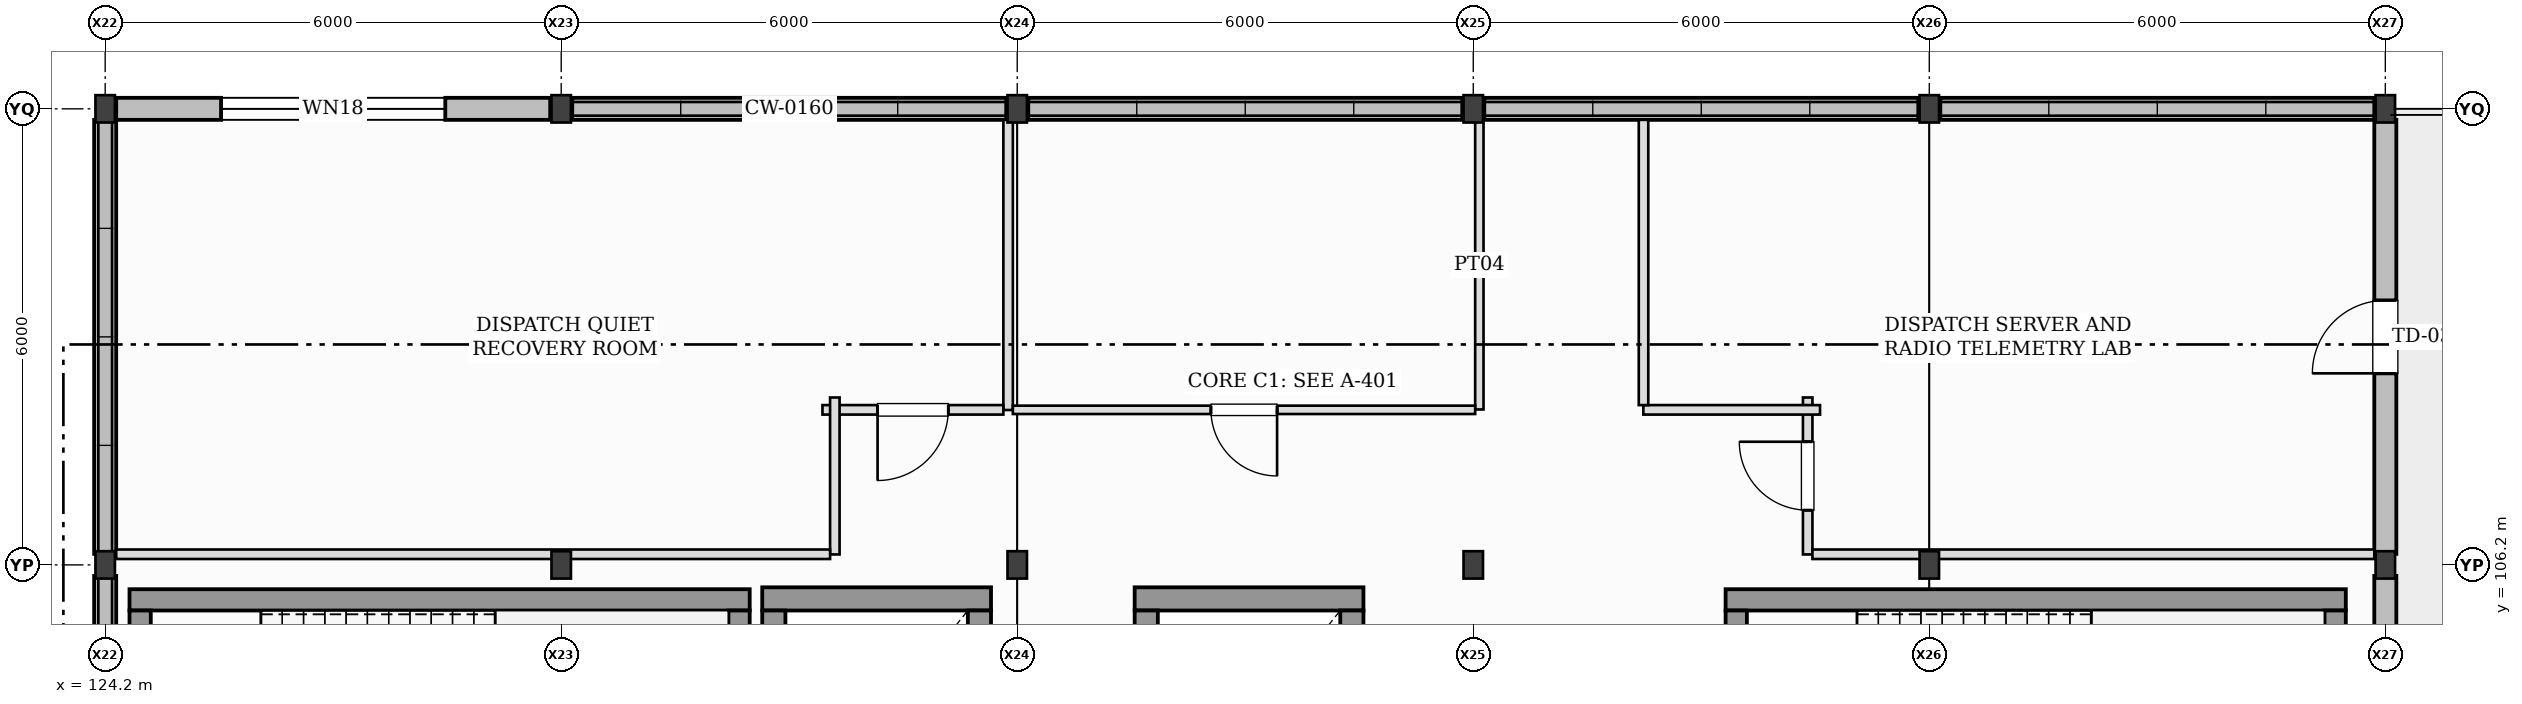
"""IFC4 building model, lengths in metres.
Left out: names, types, materials, properties, quantities, classifications, styles, units other than length and angle.
Written with IfcOpenShell. Run it as: python <this file> out.ifc"""

import sys

from ifc_helpers import new_model, si_unit, direction, frame, frame_2d, origin, origin_2d, place, context, subcontext, project, spatial, rectangle, i_section, extrude, element, fill, save


model = new_model("IFC4")
c1 = context("Model", 3, precision=1e-05, world=origin(), true_north=direction((0.0, 1.0)))
c2 = subcontext(c1, "Body", "Model", "MODEL_VIEW")
j1 = project(units=[si_unit("LENGTHUNIT", "METRE"), si_unit("PLANEANGLEUNIT", "RADIAN")], contexts=[c1])
p1 = place(None, origin())
s1 = spatial("IfcSite", under=j1, at=p1, CompositionType="ELEMENT")
p2 = place(p1, origin())
s2 = spatial("IfcBuilding", under=s1, at=p2, CompositionType="ELEMENT")
p3 = place(p2, frame((0.0, 0.0, 14.0)))
s3 = spatial("IfcBuildingStorey", under=s2, at=p3, CompositionType="ELEMENT", Elevation=14.0)
for number, where, z_axis, x_axis in (
    (1, (124.2, 106.2, 0.0), (0.0, 0.0, 1.0), (1.0, 0.0, 0.0)),
    (2, (124.2, 112.2, 0.0), (0.0, 0.0, 1.0), (1.0, 0.0, 0.0)),
    (3, (130.2, 106.2, 0.0), (0.0, 0.0, 1.0), (1.0, 0.0, 0.0)),
    (4, (130.2, 112.2, 0.0), (0.0, 0.0, 1.0), (1.0, 0.0, 0.0)),
    (5, (136.2, 106.2, 0.0), (0.0, 0.0, 1.0), (1.0, 0.0, 0.0)),
    (6, (136.2, 112.2, 0.0), (0.0, 0.0, 1.0), (1.0, 0.0, 0.0)),
    (7, (142.2, 106.2, 0.0), (0.0, 0.0, 1.0), (1.0, 0.0, 0.0)),
    (8, (142.2, 112.2, 0.0), (0.0, 0.0, 1.0), (1.0, 0.0, 0.0)),
    (9, (148.2, 106.2, 0.0), (0.0, 0.0, 1.0), (1.0, 0.0, 0.0)),
    (10, (148.2, 112.2, 0.0), (0.0, 0.0, 1.0), (1.0, 0.0, 0.0)),
    (11, (154.2, 106.2, 0.0), (0.0, 0.0, 1.0), (1.0, 0.0, 0.0)),
    (12, (154.2, 112.2, 0.0), (0.0, 0.0, 1.0), (1.0, 0.0, 0.0)),
):
    element("IfcColumn", number, at=place(p3, frame(where, z_axis=z_axis, x_axis=x_axis)), inside=s3, PredefinedType="COLUMN", context=c2, shape_type="SweptSolid", body=[
        extrude(i_section(OverallWidth=0.256, OverallDepth=0.36, WebThickness=0.011, FlangeThickness=0.02, at=origin_2d()), origin(), (0.0, 0.0, 1.0), 4.0),
    ])
p4 = place(p3, frame((130.055, 112.2, 0.0), z_axis=(0.0, 0.0, 1.0), x_axis=(-1.0, 0.0, 0.0)))
e13 = element("IfcWall", 13, at=p4, inside=s3, PredefinedType="STANDARD", context=c2, shape_type="SweptSolid", body=[
    extrude(rectangle(XDim=5.71, YDim=0.29, at=frame_2d((2.855, 0.0))), origin(), (0.0, 0.0, 1.0), 3.269),
])
p5 = place(p4, frame((1.38, 0.0, 1.0)))
e14 = element("IfcOpeningElement", 14, at=p5, cuts=e13, PredefinedType="OPENING", context=c2, shape_type="SweptSolid", body=[
    extrude(rectangle(XDim=2.95, YDim=1.55, at=frame_2d((1.475, 0.775))), frame((0.0, 0.155, 0.0), z_axis=(0.0, -1.0, 0.0), x_axis=(1.0, 0.0, 0.0)), (0.0, 0.0, 1.0), 0.31),
])
p6 = place(p3, frame((136.055, 112.2, 0.0), z_axis=(0.0, 0.0, 1.0), x_axis=(-1.0, 0.0, 0.0)))
e15 = element("IfcWall", 15, at=p6, inside=s3, PredefinedType="STANDARD", context=c2, shape_type="SweptSolid", body=[
    extrude(rectangle(XDim=5.71, YDim=0.29, at=frame_2d((2.855, 0.0))), origin(), (0.0, 0.0, 1.0), 0.32),
])
p7 = place(p3, frame((142.055, 112.2, 0.0), z_axis=(0.0, 0.0, 1.0), x_axis=(-1.0, 0.0, 0.0)))
e16 = element("IfcWall", 16, at=p7, inside=s3, PredefinedType="STANDARD", context=c2, shape_type="SweptSolid", body=[
    extrude(rectangle(XDim=5.71, YDim=0.29, at=frame_2d((2.855, 0.0))), origin(), (0.0, 0.0, 1.0), 0.44),
])
p8 = place(p3, frame((148.055, 112.2, 0.0), z_axis=(0.0, 0.0, 1.0), x_axis=(-1.0, 0.0, 0.0)))
e17 = element("IfcWall", 17, at=p8, inside=s3, PredefinedType="STANDARD", context=c2, shape_type="SweptSolid", body=[
    extrude(rectangle(XDim=5.71, YDim=0.29, at=frame_2d((2.855, 0.0))), origin(), (0.0, 0.0, 1.0), 0.56),
])
p9 = place(p3, frame((154.055, 112.2, 0.0), z_axis=(0.0, 0.0, 1.0), x_axis=(-1.0, 0.0, 0.0)))
e18 = element("IfcWall", 18, at=p9, inside=s3, PredefinedType="STANDARD", context=c2, shape_type="SweptSolid", body=[
    extrude(rectangle(XDim=5.71, YDim=0.29, at=frame_2d((2.855, 0.0))), origin(), (0.0, 0.0, 1.0), 0.68),
])
p10 = place(p3, frame((124.2, 106.055, 0.0), z_axis=(0.0, 0.0, 1.0), x_axis=(0.0, -1.0, 0.0)))
e19 = element("IfcWall", 19, at=p10, inside=s3, PredefinedType="STANDARD", context=c2, shape_type="SweptSolid", body=[
    extrude(rectangle(XDim=5.71, YDim=0.29, at=frame_2d((2.855, 0.0))), origin(), (0.0, 0.0, 1.0), 0.92),
])
p11 = place(p3, frame((124.2, 112.055, 0.0), z_axis=(0.0, 0.0, 1.0), x_axis=(0.0, -1.0, 0.0)))
e20 = element("IfcWall", 20, at=p11, inside=s3, PredefinedType="STANDARD", context=c2, shape_type="SweptSolid", body=[
    extrude(rectangle(XDim=5.71, YDim=0.29, at=frame_2d((2.855, 0.0))), origin(), (0.0, 0.0, 1.0), 0.32),
])
p12 = place(p3, frame((154.2, 100.345, 0.0), z_axis=(0.0, 0.0, 1.0), x_axis=(0.0, 1.0, 0.0)))
e21 = element("IfcWall", 21, at=p12, inside=s3, PredefinedType="STANDARD", context=c2, shape_type="SweptSolid", body=[
    extrude(rectangle(XDim=5.71, YDim=0.29, at=frame_2d((2.855, 0.0))), origin(), (0.0, 0.0, 1.0), 3.273),
])
p13 = place(p12, frame((0.643, 0.0, 0.0)))
e22 = element("IfcOpeningElement", 22, at=p13, cuts=e21, PredefinedType="OPENING", context=c2, shape_type="SweptSolid", body=[
    extrude(rectangle(XDim=1.04, YDim=2.16, at=frame_2d((0.52, 1.08))), frame((0.0, 0.155, 0.0), z_axis=(0.0, -1.0, 0.0), x_axis=(1.0, 0.0, 0.0)), (0.0, 0.0, 1.0), 0.31),
])
p14 = place(p3, frame((154.2, 106.345, 0.0), z_axis=(0.0, 0.0, 1.0), x_axis=(0.0, 1.0, 0.0)))
e23 = element("IfcWall", 23, at=p14, inside=s3, PredefinedType="STANDARD", context=c2, shape_type="SweptSolid", body=[
    extrude(rectangle(XDim=5.71, YDim=0.29, at=frame_2d((2.855, 0.0))), origin(), (0.0, 0.0, 1.0), 3.273),
])
p15 = place(p14, frame((2.375, 0.0, 0.0)))
e24 = element("IfcOpeningElement", 24, at=p15, cuts=e23, PredefinedType="OPENING", context=c2, shape_type="SweptSolid", body=[
    extrude(rectangle(XDim=0.96, YDim=2.14, at=frame_2d((0.48, 1.07))), frame((0.0, 0.155, 0.0), z_axis=(0.0, -1.0, 0.0), x_axis=(1.0, 0.0, 0.0)), (0.0, 0.0, 1.0), 0.31),
])
p16 = place(p3, frame((132.68, 105.74, 0.0), z_axis=(0.0, 0.0, 1.0), x_axis=(-1.0, 0.0, 0.0)))
e25 = element("IfcWall", 25, at=p16, inside=s3, PredefinedType="SHEAR", context=c2, shape_type="SweptSolid", body=[
    extrude(rectangle(XDim=8.16, YDim=0.28, at=frame_2d((4.08, 0.0))), origin(), (0.0, 0.0, 1.0), 4.0),
])
for number, where, z_axis, x_axis in (
    (26, (124.66, 105.6, 0.0), (0.0, 0.0, 1.0), (0.0, -1.0, 0.0)),
    (27, (132.54, 102.6, 0.0), (0.0, 0.0, 1.0), (0.0, 1.0, 0.0)),
):
    element("IfcWall", number, at=place(p3, frame(where, z_axis=z_axis, x_axis=x_axis)), inside=s3, PredefinedType="SHEAR", context=c2, shape_type="SweptSolid", body=[
        extrude(rectangle(XDim=3.0, YDim=0.28, at=frame_2d((1.5, 0.0))), origin(), (0.0, 0.0, 1.0), 4.0),
    ])
p17 = place(p3, frame((153.68, 105.74, 0.0), z_axis=(0.0, 0.0, 1.0), x_axis=(-1.0, 0.0, 0.0)))
e28 = element("IfcWall", 28, at=p17, inside=s3, PredefinedType="SHEAR", context=c2, shape_type="SweptSolid", body=[
    extrude(rectangle(XDim=8.16, YDim=0.28, at=frame_2d((4.08, 0.0))), origin(), (0.0, 0.0, 1.0), 4.0),
])
for number, where, z_axis, x_axis in (
    (29, (145.66, 105.6, 0.0), (0.0, 0.0, 1.0), (0.0, -1.0, 0.0)),
    (30, (153.54, 102.6, 0.0), (0.0, 0.0, 1.0), (0.0, 1.0, 0.0)),
):
    element("IfcWall", number, at=place(p3, frame(where, z_axis=z_axis, x_axis=x_axis)), inside=s3, PredefinedType="SHEAR", context=c2, shape_type="SweptSolid", body=[
        extrude(rectangle(XDim=3.0, YDim=0.28, at=frame_2d((1.5, 0.0))), origin(), (0.0, 0.0, 1.0), 4.0),
    ])
p18 = place(p3, frame((135.855, 105.752, 0.0), z_axis=(0.0, 0.0, 1.0), x_axis=(-1.0, 0.0, 0.0)))
e31 = element("IfcWall", 31, at=p18, inside=s3, PredefinedType="SHEAR", context=c2, shape_type="SweptSolid", body=[
    extrude(rectangle(XDim=3.01, YDim=0.305, at=frame_2d((1.505, 0.0))), origin(), (0.0, 0.0, 1.0), 4.0),
])
for number, where, z_axis, x_axis in (
    (32, (132.998, 105.6, 0.0), (0.0, 0.0, 1.0), (0.0, -1.0, 0.0)),
    (33, (135.702, 102.6, 0.0), (0.0, 0.0, 1.0), (0.0, 1.0, 0.0)),
):
    element("IfcWall", number, at=place(p3, frame(where, z_axis=z_axis, x_axis=x_axis)), inside=s3, PredefinedType="SHEAR", context=c2, shape_type="SweptSolid", body=[
        extrude(rectangle(XDim=3.0, YDim=0.305, at=frame_2d((1.5, 0.0))), origin(), (0.0, 0.0, 1.0), 4.0),
    ])
p19 = place(p3, frame((140.755, 105.752, 0.0), z_axis=(0.0, 0.0, 1.0), x_axis=(-1.0, 0.0, 0.0)))
e34 = element("IfcWall", 34, at=p19, inside=s3, PredefinedType="SHEAR", context=c2, shape_type="SweptSolid", body=[
    extrude(rectangle(XDim=3.01, YDim=0.305, at=frame_2d((1.505, 0.0))), origin(), (0.0, 0.0, 1.0), 4.0),
])
for number, where, z_axis, x_axis in (
    (35, (137.897, 105.6, 0.0), (0.0, 0.0, 1.0), (0.0, -1.0, 0.0)),
    (36, (140.603, 102.6, 0.0), (0.0, 0.0, 1.0), (0.0, 1.0, 0.0)),
):
    element("IfcWall", number, at=place(p3, frame(where, z_axis=z_axis, x_axis=x_axis)), inside=s3, PredefinedType="SHEAR", context=c2, shape_type="SweptSolid", body=[
        extrude(rectangle(XDim=3.0, YDim=0.305, at=frame_2d((1.5, 0.0))), origin(), (0.0, 0.0, 1.0), 4.0),
    ])
p20 = place(p3, frame((136.08, 112.055, 0.0), z_axis=(0.0, 0.0, 1.0), x_axis=(0.0, -1.0, 0.0)))
e37 = element("IfcWall", 37, at=p20, inside=s3, PredefinedType="PARTITIONING", context=c2, shape_type="SweptSolid", body=[
    extrude(rectangle(XDim=3.817, YDim=0.125, at=frame_2d((1.909, 0.0))), origin(), (0.0, 0.0, 1.0), 3.273),
])
p21 = place(p3, frame((136.018, 108.24, 0.0), z_axis=(0.0, 0.0, 1.0), x_axis=(-1.0, 0.0, 0.0)))
e38 = element("IfcWall", 38, at=p21, inside=s3, PredefinedType="PARTITIONING", context=c2, shape_type="SweptSolid", body=[
    extrude(rectangle(XDim=2.38, YDim=0.125, at=frame_2d((1.19, 0.0))), origin(), (0.0, 0.0, 1.0), 3.76),
])
p22 = place(p21, frame((0.725, 0.0, 0.0)))
e39 = element("IfcOpeningElement", 39, at=p22, cuts=e38, PredefinedType="OPENING", context=c2, shape_type="SweptSolid", body=[
    extrude(rectangle(XDim=0.93, YDim=2.1, at=frame_2d((0.465, 1.05))), frame((0.0, 0.073, 0.0), z_axis=(0.0, -1.0, 0.0), x_axis=(1.0, 0.0, 0.0)), (0.0, 0.0, 1.0), 0.145),
])
p23 = place(p3, frame((133.8, 108.403, 0.0), z_axis=(0.0, 0.0, 1.0), x_axis=(0.0, -1.0, 0.0)))
e40 = element("IfcWall", 40, at=p23, inside=s3, PredefinedType="PARTITIONING", context=c2, shape_type="SweptSolid", body=[
    extrude(rectangle(XDim=2.065, YDim=0.125, at=frame_2d((1.033, 0.0))), origin(), (0.0, 0.0, 1.0), 3.76),
])
p24 = place(p3, frame((133.738, 106.34, 0.0), z_axis=(0.0, 0.0, 1.0), x_axis=(-1.0, 0.0, 0.0)))
e41 = element("IfcWall", 41, at=p24, inside=s3, PredefinedType="PARTITIONING", context=c2, shape_type="SweptSolid", body=[
    extrude(rectangle(XDim=9.393, YDim=0.125, at=frame_2d((4.696, 0.0))), origin(), (0.0, 0.0, 1.0), 3.269),
])
p25 = place(p3, frame((142.28, 112.055, 0.0), z_axis=(0.0, 0.0, 1.0), x_axis=(0.0, -1.0, 0.0)))
e42 = element("IfcWall", 42, at=p25, inside=s3, PredefinedType="PARTITIONING", context=c2, shape_type="SweptSolid", body=[
    extrude(rectangle(XDim=3.81, YDim=0.11, at=frame_2d((1.905, 0.0))), origin(), (0.0, 0.0, 1.0), 3.273),
])
p26 = place(p3, frame((142.225, 108.24, 0.0), z_axis=(0.0, 0.0, 1.0), x_axis=(-1.0, 0.0, 0.0)))
e43 = element("IfcWall", 43, at=p26, inside=s3, PredefinedType="PARTITIONING", context=c2, shape_type="SweptSolid", body=[
    extrude(rectangle(XDim=6.083, YDim=0.11, at=frame_2d((3.041, 0.0))), origin(), (0.0, 0.0, 1.0), 3.76),
])
p27 = place(p26, frame((2.606, 0.0, 0.0)))
e44 = element("IfcOpeningElement", 44, at=p27, cuts=e43, PredefinedType="OPENING", context=c2, shape_type="SweptSolid", body=[
    extrude(rectangle(XDim=0.87, YDim=2.06, at=frame_2d((0.435, 1.03))), frame((0.0, 0.065, 0.0), z_axis=(0.0, -1.0, 0.0), x_axis=(1.0, 0.0, 0.0)), (0.0, 0.0, 1.0), 0.13),
])
p28 = place(p3, frame((146.6, 106.337, 0.0), z_axis=(0.0, 0.0, 1.0), x_axis=(0.0, 1.0, 0.0)))
e45 = element("IfcWall", 45, at=p28, inside=s3, PredefinedType="PARTITIONING", context=c2, shape_type="SweptSolid", body=[
    extrude(rectangle(XDim=2.065, YDim=0.125, at=frame_2d((1.033, 0.0))), origin(), (0.0, 0.0, 1.0), 3.76),
])
p29 = place(p28, frame((0.583, 0.0, 0.0)))
e46 = element("IfcOpeningElement", 46, at=p29, cuts=e45, PredefinedType="OPENING", context=c2, shape_type="SweptSolid", body=[
    extrude(rectangle(XDim=0.9, YDim=2.1, at=frame_2d((0.45, 1.05))), frame((0.0, 0.073, 0.0), z_axis=(0.0, -1.0, 0.0), x_axis=(1.0, 0.0, 0.0)), (0.0, 0.0, 1.0), 0.145),
])
p30 = place(p3, frame((146.762, 108.24, 0.0), z_axis=(0.0, 0.0, 1.0), x_axis=(-1.0, 0.0, 0.0)))
e47 = element("IfcWall", 47, at=p30, inside=s3, PredefinedType="PARTITIONING", context=c2, shape_type="SweptSolid", body=[
    extrude(rectangle(XDim=2.325, YDim=0.125, at=frame_2d((1.163, 0.0))), origin(), (0.0, 0.0, 1.0), 3.76),
])
p31 = place(p3, frame((144.44, 108.302, 0.0), z_axis=(0.0, 0.0, 1.0), x_axis=(0.0, 1.0, 0.0)))
e48 = element("IfcWall", 48, at=p31, inside=s3, PredefinedType="PARTITIONING", context=c2, shape_type="SweptSolid", body=[
    extrude(rectangle(XDim=3.752, YDim=0.125, at=frame_2d((1.876, 0.0))), origin(), (0.0, 0.0, 1.0), 3.374),
])
p32 = place(p3, frame((154.055, 106.34, 0.0), z_axis=(0.0, 0.0, 1.0), x_axis=(-1.0, 0.0, 0.0)))
e49 = element("IfcWall", 49, at=p32, inside=s3, PredefinedType="PARTITIONING", context=c2, shape_type="SweptSolid", body=[
    extrude(rectangle(XDim=7.392, YDim=0.125, at=frame_2d((3.696, 0.0))), origin(), (0.0, 0.0, 1.0), 3.269),
])
p33 = place(p5, origin())
e50 = element("IfcWindow", 50, at=p33, inside=s3, PartitioningType="SINGLE_PANEL", PredefinedType="WINDOW", context=c2, shape_type="SweptSolid", body=[
    extrude(rectangle(XDim=2.95, YDim=1.55, at=frame_2d((1.475, 0.775))), frame((0.0, 0.03, 0.0), z_axis=(0.0, -1.0, 0.0), x_axis=(1.0, 0.0, 0.0)), (0.0, 0.0, 1.0), 0.06),
])
fill(e14, e50)
p34 = place(p15, frame((0.96, 0.0, 0.0), z_axis=(0.0, 0.0, 1.0), x_axis=(-1.0, 0.0, 0.0)))
e51 = element("IfcDoor", 51, at=p34, inside=s3, OperationType="SINGLE_SWING_LEFT", PredefinedType="DOOR", context=c2, shape_type="SweptSolid", body=[
    extrude(rectangle(XDim=0.96, YDim=2.14, at=frame_2d((0.48, 1.07))), frame((0.0, 0.025, 0.0), z_axis=(0.0, -1.0, 0.0), x_axis=(1.0, 0.0, 0.0)), (0.0, 0.0, 1.0), 0.05),
])
fill(e24, e51)
p35 = place(p22, frame((0.93, 0.0, 0.0), z_axis=(0.0, 0.0, 1.0), x_axis=(-1.0, 0.0, 0.0)))
e52 = element("IfcDoor", 52, at=p35, inside=s3, OperationType="SINGLE_SWING_RIGHT", PredefinedType="DOOR", context=c2, shape_type="SweptSolid", body=[
    extrude(rectangle(XDim=0.93, YDim=2.1, at=frame_2d((0.465, 1.05))), frame((0.0, 0.025, 0.0), z_axis=(0.0, -1.0, 0.0), x_axis=(1.0, 0.0, 0.0)), (0.0, 0.0, 1.0), 0.05),
])
fill(e39, e52)
p36 = place(p27, frame((0.87, 0.0, 0.0), z_axis=(0.0, 0.0, 1.0), x_axis=(-1.0, 0.0, 0.0)))
e53 = element("IfcDoor", 53, at=p36, inside=s3, OperationType="SINGLE_SWING_LEFT", PredefinedType="DOOR", context=c2, shape_type="SweptSolid", body=[
    extrude(rectangle(XDim=0.87, YDim=2.06, at=frame_2d((0.435, 1.03))), frame((0.0, 0.025, 0.0), z_axis=(0.0, -1.0, 0.0), x_axis=(1.0, 0.0, 0.0)), (0.0, 0.0, 1.0), 0.05),
])
fill(e44, e53)
p37 = place(p29, frame((0.9, 0.0, 0.0), z_axis=(0.0, 0.0, 1.0), x_axis=(-1.0, 0.0, 0.0)))
e54 = element("IfcDoor", 54, at=p37, inside=s3, OperationType="SINGLE_SWING_RIGHT", PredefinedType="DOOR", context=c2, shape_type="SweptSolid", body=[
    extrude(rectangle(XDim=0.9, YDim=2.1, at=frame_2d((0.45, 1.05))), frame((0.0, 0.025, 0.0), z_axis=(0.0, -1.0, 0.0), x_axis=(1.0, 0.0, 0.0)), (0.0, 0.0, 1.0), 0.05),
])
fill(e46, e54)
save(model, sys.argv[1])
